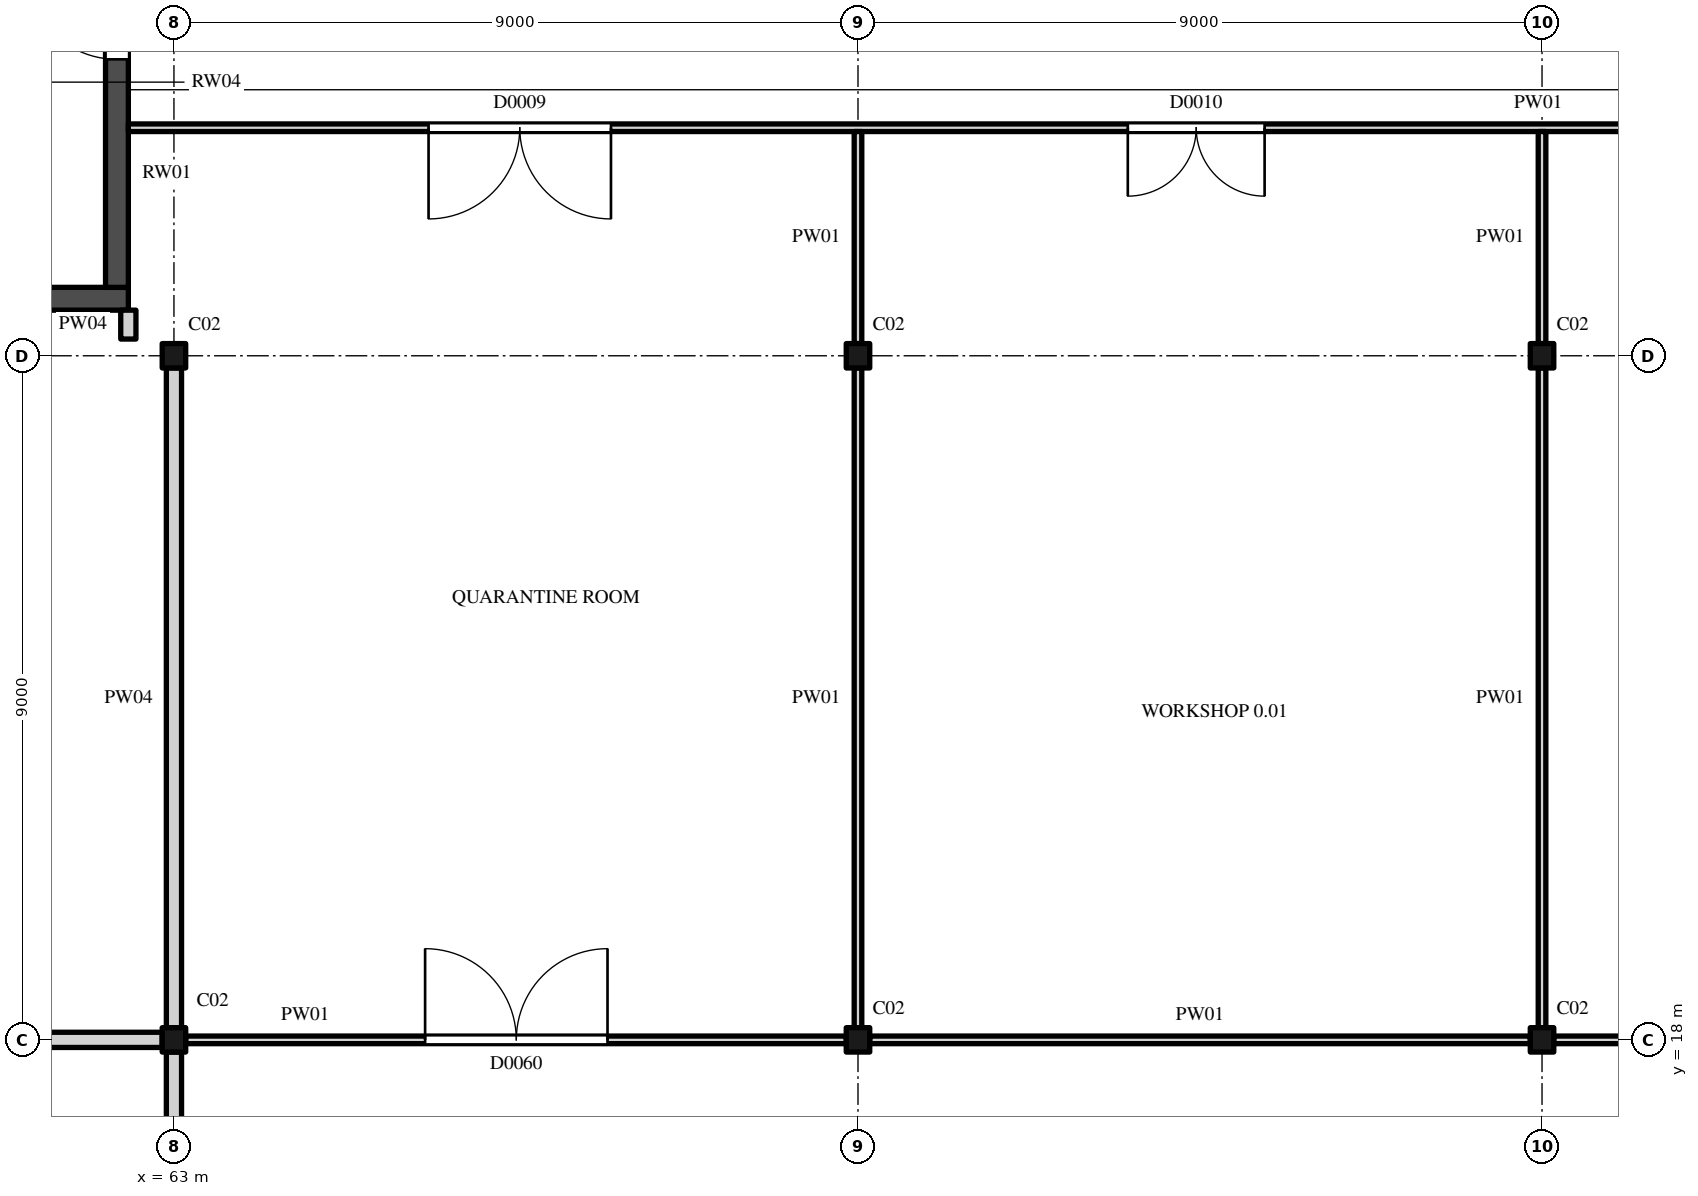
"""IFC4 building model, lengths in metres.
Left out: names, types, materials, properties, quantities, classifications, styles, units other than length and angle.
Written with IfcOpenShell. Run it as: python <this file> out.ifc"""

import sys

from ifc_helpers import new_model, si_unit, direction, frame, frame_2d, origin, origin_2d, place, context, subcontext, project, spatial, rectangle, i_section, extrude, element, fill, save


model = new_model("IFC4")
c1 = context("Model", 3, precision=1e-05, world=origin(), true_north=direction((0.0, 1.0)))
c2 = subcontext(c1, "Body", "Model", "MODEL_VIEW")
j1 = project(units=[si_unit("LENGTHUNIT", "METRE"), si_unit("PLANEANGLEUNIT", "RADIAN")], contexts=[c1])
p1 = place(None, origin())
s1 = spatial("IfcSite", under=j1, at=p1, CompositionType="ELEMENT")
p2 = place(p1, origin())
s2 = spatial("IfcBuilding", under=s1, at=p2, CompositionType="ELEMENT")
p3 = place(p2, origin())
s3 = spatial("IfcBuildingStorey", under=s2, at=p3, CompositionType="ELEMENT", Elevation=0.0)
for number, where, z_axis, x_axis in (
    (1, (63.0, 18.0, 0.0), (0.0, 0.0, 1.0), (1.0, 0.0, 0.0)),
    (2, (72.0, 18.0, 0.0), (0.0, 0.0, 1.0), (1.0, 0.0, 0.0)),
    (3, (81.0, 18.0, 0.0), (0.0, 0.0, 1.0), (1.0, 0.0, 0.0)),
    (4, (63.0, 27.0, 0.0), (0.0, 0.0, 1.0), (1.0, 0.0, 0.0)),
    (5, (72.0, 27.0, 0.0), (0.0, 0.0, 1.0), (1.0, 0.0, 0.0)),
    (6, (81.0, 27.0, 0.0), (0.0, 0.0, 1.0), (1.0, 0.0, 0.0)),
):
    element("IfcColumn", number, at=place(p3, frame(where, z_axis=z_axis, x_axis=x_axis)), inside=s3, PredefinedType="COLUMN", context=c2, shape_type="SweptSolid", body=[
        extrude(i_section(OverallWidth=0.309, OverallDepth=0.321, WebThickness=0.014, FlangeThickness=0.022, FilletRadius=0.017, at=origin_2d()), origin(), (0.0, 0.0, 1.0), 6.0),
    ])
p4 = place(p3, frame((54.3, 27.75, 0.0), z_axis=(0.0, 0.0, 1.0), x_axis=(1.0, 0.0, 0.0)))
e7 = element("IfcWall", 7, at=p4, inside=s3, PredefinedType="SHEAR", context=c2, shape_type="SweptSolid", body=[
    extrude(rectangle(XDim=8.1, YDim=0.3, at=frame_2d((4.05, 0.0))), origin(), (0.0, 0.0, 1.0), 6.0),
])
p5 = place(p3, frame((62.25, 27.9, 0.0), z_axis=(0.0, 0.0, 1.0), x_axis=(0.0, 1.0, 0.0)))
e8 = element("IfcWall", 8, at=p5, inside=s3, PredefinedType="SHEAR", context=c2, shape_type="SweptSolid", body=[
    extrude(rectangle(XDim=7.2, YDim=0.3, at=frame_2d((3.6, 0.0))), origin(), (0.0, 0.0, 1.0), 6.0),
])
p6 = place(p5, frame((3.0, 0.0, 0.0)))
e9 = element("IfcOpeningElement", 9, at=p6, cuts=e8, PredefinedType="OPENING", context=c2, shape_type="SweptSolid", body=[
    extrude(rectangle(XDim=1.2, YDim=2.1, at=frame_2d((0.6, 1.05))), frame((0.0, 0.16, 0.0), z_axis=(0.0, -1.0, 0.0), x_axis=(1.0, 0.0, 0.0)), (0.0, 0.0, 1.0), 0.32),
])
p7 = place(p3, frame((54.3, 18.0, 0.0), z_axis=(0.0, 0.0, 1.0), x_axis=(1.0, 0.0, 0.0)))
e10 = element("IfcWall", 10, at=p7, inside=s3, PredefinedType="PARTITIONING", context=c2, shape_type="SweptSolid", body=[
    extrude(rectangle(XDim=8.545, YDim=0.2, at=frame_2d((4.273, 0.0))), origin(), (0.0, 0.0, 1.0), 5.419),
])
p8 = place(p7, frame((3.65, 0.0, 0.0)))
e11 = element("IfcOpeningElement", 11, at=p8, cuts=e10, PredefinedType="OPENING", context=c2, shape_type="SweptSolid", body=[
    extrude(rectangle(XDim=1.2, YDim=2.4, at=frame_2d((0.6, 1.2))), frame((0.0, 0.11, 0.0), z_axis=(0.0, -1.0, 0.0), x_axis=(1.0, 0.0, 0.0)), (0.0, 0.0, 1.0), 0.22),
])
p9 = place(p3, frame((63.155, 18.0, 0.0), z_axis=(0.0, 0.0, 1.0), x_axis=(1.0, 0.0, 0.0)))
e12 = element("IfcWall", 12, at=p9, inside=s3, PredefinedType="PARTITIONING", context=c2, shape_type="SweptSolid", body=[
    extrude(rectangle(XDim=8.691, YDim=0.1, at=frame_2d((4.345, 0.0))), origin(), (0.0, 0.0, 1.0), 5.419),
])
p10 = place(p9, frame((3.15, 0.0, 0.0)))
e13 = element("IfcOpeningElement", 13, at=p10, cuts=e12, PredefinedType="OPENING", context=c2, shape_type="SweptSolid", body=[
    extrude(rectangle(XDim=2.4, YDim=3.0, at=frame_2d((1.2, 1.5))), frame((0.0, 0.06, 0.0), z_axis=(0.0, -1.0, 0.0), x_axis=(1.0, 0.0, 0.0)), (0.0, 0.0, 1.0), 0.12),
])
for number, where, z_axis, x_axis in (
    (14, (72.155, 18.0, 0.0), (0.0, 0.0, 1.0), (1.0, 0.0, 0.0)),
    (15, (81.155, 18.0, 0.0), (0.0, 0.0, 1.0), (1.0, 0.0, 0.0)),
):
    element("IfcWall", number, at=place(p3, frame(where, z_axis=z_axis, x_axis=x_axis)), inside=s3, PredefinedType="PARTITIONING", context=c2, shape_type="SweptSolid", body=[
        extrude(rectangle(XDim=8.691, YDim=0.1, at=frame_2d((4.345, 0.0))), origin(), (0.0, 0.0, 1.0), 5.419),
    ])
p11 = place(p3, frame((62.4, 30.0, 0.0), z_axis=(0.0, 0.0, 1.0), x_axis=(1.0, 0.0, 0.0)))
e16 = element("IfcWall", 16, at=p11, inside=s3, PredefinedType="PARTITIONING", context=c2, shape_type="SweptSolid", body=[
    extrude(rectangle(XDim=36.65, YDim=0.1, at=frame_2d((18.325, 0.0))), origin(), (0.0, 0.0, 1.0), 5.422),
])
p12 = place(p11, frame((3.95, 0.0, 0.0)))
e17 = element("IfcOpeningElement", 17, at=p12, cuts=e16, PredefinedType="OPENING", context=c2, shape_type="SweptSolid", body=[
    extrude(rectangle(XDim=2.4, YDim=3.0, at=frame_2d((1.2, 1.5))), frame((0.0, 0.06, 0.0), z_axis=(0.0, -1.0, 0.0), x_axis=(1.0, 0.0, 0.0)), (0.0, 0.0, 1.0), 0.12),
])
p13 = place(p11, frame((13.15, 0.0, 0.0)))
e18 = element("IfcOpeningElement", 18, at=p13, cuts=e16, PredefinedType="OPENING", context=c2, shape_type="SweptSolid", body=[
    extrude(rectangle(XDim=1.8, YDim=2.4, at=frame_2d((0.9, 1.2))), frame((0.0, 0.06, 0.0), z_axis=(0.0, -1.0, 0.0), x_axis=(1.0, 0.0, 0.0)), (0.0, 0.0, 1.0), 0.12),
])
p14 = place(p11, frame((22.15, 0.0, 0.0)))
e19 = element("IfcOpeningElement", 19, at=p14, cuts=e16, PredefinedType="OPENING", context=c2, shape_type="SweptSolid", body=[
    extrude(rectangle(XDim=1.8, YDim=2.4, at=frame_2d((0.9, 1.2))), frame((0.0, 0.06, 0.0), z_axis=(0.0, -1.0, 0.0), x_axis=(1.0, 0.0, 0.0)), (0.0, 0.0, 1.0), 0.12),
])
p15 = place(p11, frame((30.75, 0.0, 0.0)))
e20 = element("IfcOpeningElement", 20, at=p15, cuts=e16, PredefinedType="OPENING", context=c2, shape_type="SweptSolid", body=[
    extrude(rectangle(XDim=2.7, YDim=3.0, at=frame_2d((1.35, 1.5))), frame((0.0, 0.06, 0.0), z_axis=(0.0, -1.0, 0.0), x_axis=(1.0, 0.0, 0.0)), (0.0, 0.0, 1.0), 0.12),
])
p16 = place(p3, frame((62.4, 27.22, 0.0), z_axis=(0.0, 0.0, 1.0), x_axis=(0.0, 1.0, 0.0)))
e21 = element("IfcWall", 21, at=p16, inside=s3, PredefinedType="PARTITIONING", context=c2, shape_type="SweptSolid", body=[
    extrude(rectangle(XDim=0.38, YDim=0.2, at=frame_2d((0.19, 0.0))), origin(), (0.0, 0.0, 1.0), 5.825),
])
for number, where, z_axis, x_axis in (
    (22, (63.0, 9.16, 0.0), (0.0, 0.0, 1.0), (0.0, 1.0, 0.0)),
    (23, (63.0, 18.16, 0.0), (0.0, 0.0, 1.0), (0.0, 1.0, 0.0)),
):
    element("IfcWall", number, at=place(p3, frame(where, z_axis=z_axis, x_axis=x_axis)), inside=s3, PredefinedType="PARTITIONING", context=c2, shape_type="SweptSolid", body=[
        extrude(rectangle(XDim=8.679, YDim=0.2, at=frame_2d((4.34, 0.0))), origin(), (0.0, 0.0, 1.0), 5.292),
    ])
p17 = place(p3, frame((72.0, 18.16, 0.0), z_axis=(0.0, 0.0, 1.0), x_axis=(0.0, 1.0, 0.0)))
e24 = element("IfcWall", 24, at=p17, inside=s3, PredefinedType="PARTITIONING", context=c2, shape_type="SweptSolid", body=[
    extrude(rectangle(XDim=8.679, YDim=0.1, at=frame_2d((4.34, 0.0))), origin(), (0.0, 0.0, 1.0), 5.292),
])
p18 = place(p3, frame((72.0, 27.16, 0.0), z_axis=(0.0, 0.0, 1.0), x_axis=(0.0, 1.0, 0.0)))
e25 = element("IfcWall", 25, at=p18, inside=s3, PredefinedType="PARTITIONING", context=c2, shape_type="SweptSolid", body=[
    extrude(rectangle(XDim=2.79, YDim=0.1, at=frame_2d((1.395, 0.0))), origin(), (0.0, 0.0, 1.0), 5.292),
])
p19 = place(p3, frame((81.0, 18.16, 0.0), z_axis=(0.0, 0.0, 1.0), x_axis=(0.0, 1.0, 0.0)))
e26 = element("IfcWall", 26, at=p19, inside=s3, PredefinedType="PARTITIONING", context=c2, shape_type="SweptSolid", body=[
    extrude(rectangle(XDim=8.679, YDim=0.1, at=frame_2d((4.34, 0.0))), origin(), (0.0, 0.0, 1.0), 5.292),
])
p20 = place(p3, frame((81.0, 27.16, 0.0), z_axis=(0.0, 0.0, 1.0), x_axis=(0.0, 1.0, 0.0)))
e27 = element("IfcWall", 27, at=p20, inside=s3, PredefinedType="PARTITIONING", context=c2, shape_type="SweptSolid", body=[
    extrude(rectangle(XDim=2.79, YDim=0.1, at=frame_2d((1.395, 0.0))), origin(), (0.0, 0.0, 1.0), 5.292),
])
p21 = place(p6, origin())
e28 = element("IfcDoor", 28, at=p21, inside=s3, OperationType="SINGLE_SWING_LEFT", PredefinedType="DOOR", context=c2, shape_type="SweptSolid", body=[
    extrude(rectangle(XDim=1.2, YDim=2.1, at=frame_2d((0.6, 1.05))), frame((0.0, 0.025, 0.0), z_axis=(0.0, -1.0, 0.0), x_axis=(1.0, 0.0, 0.0)), (0.0, 0.0, 1.0), 0.05),
])
fill(e9, e28)
p22 = place(p12, origin())
e29 = element("IfcDoor", 29, at=p22, inside=s3, OperationType="DOUBLE_DOOR_SINGLE_SWING", PredefinedType="DOOR", context=c2, shape_type="SweptSolid", body=[
    extrude(rectangle(XDim=2.4, YDim=3.0, at=frame_2d((1.2, 1.5))), frame((0.0, 0.025, 0.0), z_axis=(0.0, -1.0, 0.0), x_axis=(1.0, 0.0, 0.0)), (0.0, 0.0, 1.0), 0.05),
])
fill(e17, e29)
p23 = place(p13, origin())
e30 = element("IfcDoor", 30, at=p23, inside=s3, OperationType="DOUBLE_DOOR_SINGLE_SWING", PredefinedType="DOOR", context=c2, shape_type="SweptSolid", body=[
    extrude(rectangle(XDim=1.8, YDim=2.4, at=frame_2d((0.9, 1.2))), frame((0.0, 0.025, 0.0), z_axis=(0.0, -1.0, 0.0), x_axis=(1.0, 0.0, 0.0)), (0.0, 0.0, 1.0), 0.05),
])
fill(e18, e30)
p24 = place(p10, origin())
e31 = element("IfcDoor", 31, at=p24, inside=s3, OperationType="DOUBLE_DOOR_SINGLE_SWING", PredefinedType="DOOR", context=c2, shape_type="SweptSolid", body=[
    extrude(rectangle(XDim=2.4, YDim=3.0, at=frame_2d((1.2, 1.5))), frame((0.0, 0.025, 0.0), z_axis=(0.0, -1.0, 0.0), x_axis=(1.0, 0.0, 0.0)), (0.0, 0.0, 1.0), 0.05),
])
fill(e13, e31)
save(model, sys.argv[1])
